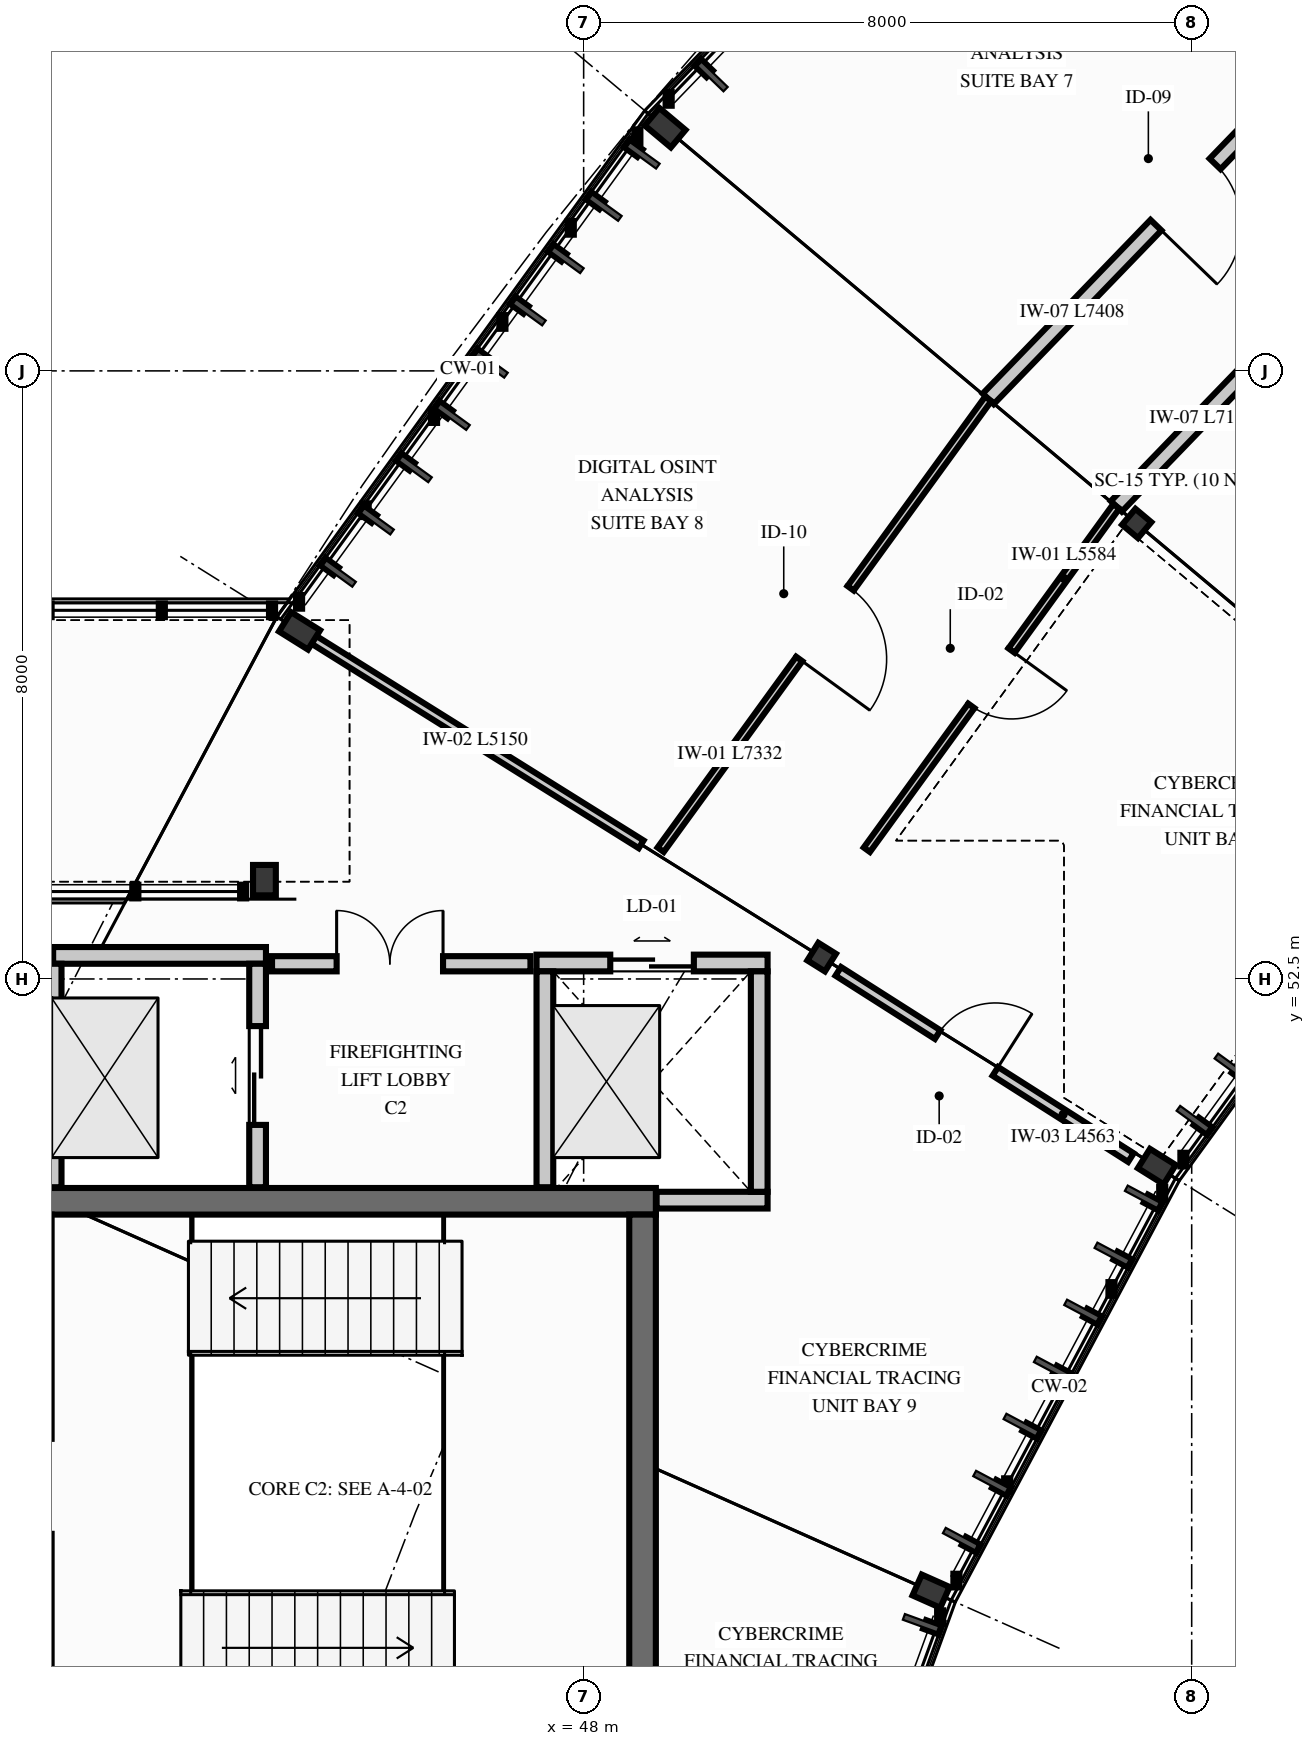
"""IFC4 building model, lengths in metres.
Left out: names, types, materials, properties, quantities, classifications, styles, units other than length and angle.
Written with IfcOpenShell. Run it as: python <this file> out.ifc"""

import sys

from ifc_helpers import new_model, si_unit, direction, frame, frame_2d, origin, origin_2d, place, context, subcontext, project, spatial, rectangle, hollow_circle, i_section, extrude, element, fill, save


model = new_model("IFC4")
c1 = context("Model", 3, precision=1e-05, world=origin(), true_north=direction((0.0, 1.0)))
c2 = subcontext(c1, "Body", "Model", "MODEL_VIEW")
j1 = project(units=[si_unit("LENGTHUNIT", "METRE"), si_unit("PLANEANGLEUNIT", "RADIAN")], contexts=[c1])
p1 = place(None, origin())
s1 = spatial("IfcSite", under=j1, at=p1, CompositionType="ELEMENT")
p2 = place(p1, origin())
s2 = spatial("IfcBuilding", under=s1, at=p2, CompositionType="ELEMENT")
p3 = place(p2, frame((0.0, 0.0, 13.5)))
s3 = spatial("IfcBuildingStorey", under=s2, at=p3, CompositionType="ELEMENT", Elevation=13.5)
p4 = place(p3, frame((40.65, 49.575, 0.0), z_axis=(0.0, 0.0, 1.0), x_axis=(1.0, 0.0, 0.0)))
e1 = element("IfcWall", 1, at=p4, inside=s3, PredefinedType="SHEAR", context=c2, shape_type="SweptSolid", body=[
    extrude(rectangle(XDim=8.3, YDim=0.35, at=frame_2d((4.15, 0.0))), origin(), (0.0, 0.0, 1.0), 4.0),
])
p5 = place(p3, frame((48.775, 42.6, 0.0), z_axis=(0.0, 0.0, 1.0), x_axis=(0.0, 1.0, 0.0)))
e2 = element("IfcWall", 2, at=p5, inside=s3, PredefinedType="SHEAR", context=c2, shape_type="SweptSolid", body=[
    extrude(rectangle(XDim=6.8, YDim=0.35, at=frame_2d((3.4, 0.0))), origin(), (0.0, 0.0, 1.0), 4.0),
])
p6 = place(p3, frame((55.277, 58.493, 0.0), z_axis=(0.0, 0.0, 1.0), x_axis=(0.642787609687, 0.766044443119, 0.0)))
e3 = element("IfcColumn", 3, at=p6, inside=s3, PredefinedType="COLUMN", context=c2, shape_type="SweptSolid", body=[
    extrude(hollow_circle(Radius=0.136, WallThickness=0.012, at=origin_2d()), origin(), (0.0, 0.0, 1.0), 4.2),
])
p7 = place(p3, frame((49.072, 63.699, 0.0), z_axis=(0.0, 0.0, 1.0), x_axis=(0.642787609687, 0.766044443119, 0.0)))
e4 = element("IfcColumn", 4, at=p7, inside=s3, PredefinedType="COLUMN", context=c2, shape_type="SweptSolid", body=[
    extrude(i_section(OverallWidth=0.3, OverallDepth=0.45, WebThickness=0.014, FlangeThickness=0.026, FilletRadius=0.027, at=origin_2d()), origin(), (0.0, 0.0, 1.0), 4.2),
])
p8 = place(p3, frame((55.541, 50.032, 0.0), z_axis=(0.0, 0.0, 1.0), x_axis=(0.529919264233, 0.848048096156, 0.0)))
e5 = element("IfcColumn", 5, at=p8, inside=s3, PredefinedType="COLUMN", context=c2, shape_type="SweptSolid", body=[
    extrude(i_section(OverallWidth=0.3, OverallDepth=0.4, WebThickness=0.013, FlangeThickness=0.024, FilletRadius=0.027, at=origin_2d()), origin(), (0.0, 0.0, 1.0), 4.2),
])
p9 = place(p3, frame((51.131, 52.787, 0.0), z_axis=(0.0, 0.0, 1.0), x_axis=(0.529919264233, 0.848048096156, 0.0)))
e6 = element("IfcColumn", 6, at=p9, inside=s3, PredefinedType="COLUMN", context=c2, shape_type="SweptSolid", body=[
    extrude(hollow_circle(Radius=0.136, WallThickness=0.012, at=origin_2d()), origin(), (0.0, 0.0, 1.0), 4.2),
])
p10 = place(p3, frame((44.262, 57.08, 0.0), z_axis=(0.0, 0.0, 1.0), x_axis=(0.529919264233, 0.848048096156, 0.0)))
e7 = element("IfcColumn", 7, at=p10, inside=s3, PredefinedType="COLUMN", context=c2, shape_type="SweptSolid", body=[
    extrude(i_section(OverallWidth=0.3, OverallDepth=0.45, WebThickness=0.014, FlangeThickness=0.026, FilletRadius=0.027, at=origin_2d()), origin(), (0.0, 0.0, 1.0), 4.2),
])
p11 = place(p3, frame((52.571, 44.446, 0.0), z_axis=(0.0, 0.0, 1.0), x_axis=(0.406736643076, 0.913545457643, 0.0)))
e8 = element("IfcColumn", 8, at=p11, inside=s3, PredefinedType="COLUMN", context=c2, shape_type="SweptSolid", body=[
    extrude(i_section(OverallWidth=0.3, OverallDepth=0.4, WebThickness=0.013, FlangeThickness=0.024, FilletRadius=0.027, at=origin_2d()), origin(), (0.0, 0.0, 1.0), 4.2),
])
p12 = place(p3, frame((43.8, 53.8, 0.0), z_axis=(0.0, 0.0, 1.0), x_axis=(1.0, 0.0, 0.0)))
e9 = element("IfcColumn", 9, at=p12, inside=s3, PredefinedType="COLUMN", context=c2, shape_type="SweptSolid", body=[
    extrude(i_section(OverallWidth=0.3, OverallDepth=0.4, WebThickness=0.013, FlangeThickness=0.024, FilletRadius=0.027, at=origin_2d()), origin(), (0.0, 0.0, 1.0), 3.94),
])
p13 = place(p3, frame((41.02, 52.81, 0.0), z_axis=(0.0, 0.0, 1.0), x_axis=(1.0, 0.0, 0.0)))
e10 = element("IfcWall", 10, at=p13, inside=s3, PredefinedType="PARTITIONING", context=c2, shape_type="SweptSolid", body=[
    extrude(rectangle(XDim=2.8, YDim=0.22, at=frame_2d((1.4, 0.0))), origin(), (0.0, 0.0, 1.0), 3.98),
])
p14 = place(p3, frame((41.02, 49.76, 0.0), z_axis=(0.0, 0.0, 1.0), x_axis=(0.0, 1.0, 0.0)))
e11 = element("IfcWall", 11, at=p14, inside=s3, PredefinedType="PARTITIONING", context=c2, shape_type="SweptSolid", body=[
    extrude(rectangle(XDim=2.94, YDim=0.22, at=frame_2d((1.47, 0.0))), origin(), (0.0, 0.0, 1.0), 3.98),
])
p15 = place(p3, frame((43.71, 49.76, 0.0), z_axis=(0.0, 0.0, 1.0), x_axis=(0.0, 1.0, 0.0)))
e12 = element("IfcWall", 12, at=p15, inside=s3, PredefinedType="PARTITIONING", context=c2, shape_type="SweptSolid", body=[
    extrude(rectangle(XDim=2.94, YDim=0.22, at=frame_2d((1.47, 0.0))), origin(), (0.0, 0.0, 1.0), 3.98),
])
p16 = place(p15, frame((0.82, 0.0, 0.0)))
e13 = element("IfcOpeningElement", 13, at=p16, cuts=e12, PredefinedType="OPENING", context=c2, shape_type="SweptSolid", body=[
    extrude(rectangle(XDim=1.3, YDim=2.2, at=frame_2d((0.65, 1.1))), frame((0.0, 0.12, 0.0), z_axis=(0.0, -1.0, 0.0), x_axis=(1.0, 0.0, 0.0)), (0.0, 0.0, 1.0), 0.24),
])
p17 = place(p3, frame((48.96, 49.59, 0.0), z_axis=(0.0, 0.0, 1.0), x_axis=(1.0, 0.0, 0.0)))
e14 = element("IfcWall", 14, at=p17, inside=s3, PredefinedType="PARTITIONING", context=c2, shape_type="SweptSolid", body=[
    extrude(rectangle(XDim=1.46, YDim=0.22, at=frame_2d((0.73, 0.0))), origin(), (0.0, 0.0, 1.0), 3.98),
])
p18 = place(p3, frame((47.38, 52.71, 0.0), z_axis=(0.0, 0.0, 1.0), x_axis=(1.0, 0.0, 0.0)))
e15 = element("IfcWall", 15, at=p18, inside=s3, PredefinedType="PARTITIONING", context=c2, shape_type="SweptSolid", body=[
    extrude(rectangle(XDim=3.04, YDim=0.22, at=frame_2d((1.52, 0.0))), origin(), (0.0, 0.0, 1.0), 3.98),
])
p19 = place(p18, frame((0.97, 0.0, 0.0)))
e16 = element("IfcOpeningElement", 16, at=p19, cuts=e15, PredefinedType="OPENING", context=c2, shape_type="SweptSolid", body=[
    extrude(rectangle(XDim=1.1, YDim=2.15, at=frame_2d((0.55, 1.075))), frame((0.0, 0.12, 0.0), z_axis=(0.0, -1.0, 0.0), x_axis=(1.0, 0.0, 0.0)), (0.0, 0.0, 1.0), 0.24),
])
p20 = place(p3, frame((47.49, 49.76, 0.0), z_axis=(0.0, 0.0, 1.0), x_axis=(0.0, 1.0, 0.0)))
e17 = element("IfcWall", 17, at=p20, inside=s3, PredefinedType="PARTITIONING", context=c2, shape_type="SweptSolid", body=[
    extrude(rectangle(XDim=2.84, YDim=0.22, at=frame_2d((1.42, 0.0))), origin(), (0.0, 0.0, 1.0), 3.98),
])
p21 = place(p3, frame((50.31, 49.7, 0.0), z_axis=(0.0, 0.0, 1.0), x_axis=(0.0, 1.0, 0.0)))
e18 = element("IfcWall", 18, at=p21, inside=s3, PredefinedType="PARTITIONING", context=c2, shape_type="SweptSolid", body=[
    extrude(rectangle(XDim=2.9, YDim=0.22, at=frame_2d((1.45, 0.0))), origin(), (0.0, 0.0, 1.0), 3.98),
])
p22 = place(p3, frame((43.9, 52.7, 0.0), z_axis=(0.0, 0.0, 1.0), x_axis=(1.0, 0.0, 0.0)))
e19 = element("IfcWall", 19, at=p22, inside=s3, PredefinedType="PARTITIONING", context=c2, shape_type="SweptSolid", body=[
    extrude(rectangle(XDim=3.4, YDim=0.2, at=frame_2d((1.7, 0.0))), origin(), (0.0, 0.0, 1.0), 3.98),
])
p23 = place(p22, frame((0.85, 0.0, 0.0)))
e20 = element("IfcOpeningElement", 20, at=p23, cuts=e19, PredefinedType="OPENING", context=c2, shape_type="SweptSolid", body=[
    extrude(rectangle(XDim=1.4, YDim=2.25, at=frame_2d((0.7, 1.125))), frame((0.0, 0.11, 0.0), z_axis=(0.0, -1.0, 0.0), x_axis=(1.0, 0.0, 0.0)), (0.0, 0.0, 1.0), 0.22),
])
p24 = place(p3, frame((51.35, 52.6, 0.0), z_axis=(0.0, 0.0, 1.0), x_axis=(0.84363284859, -0.536920493909, 0.0)))
e21 = element("IfcWall", 21, at=p24, inside=s3, PredefinedType="PARTITIONING", context=c2, shape_type="SweptSolid", body=[
    extrude(rectangle(XDim=4.563, YDim=0.135, at=frame_2d((2.282, 0.0))), origin(), (0.0, 0.0, 1.0), 3.6),
])
p25 = place(p24, frame((1.55, 0.0, 0.0)))
e22 = element("IfcOpeningElement", 22, at=p25, cuts=e21, PredefinedType="OPENING", context=c2, shape_type="SweptSolid", body=[
    extrude(rectangle(XDim=0.9, YDim=2.1, at=frame_2d((0.45, 1.05))), frame((0.0, 0.077, 0.0), z_axis=(0.0, -1.0, 0.0), x_axis=(1.0, 0.0, 0.0)), (0.0, 0.0, 1.0), 0.155),
])
p26 = place(p3, frame((59.941, 63.826, 0.0), z_axis=(0.0, 0.0, 1.0), x_axis=(-0.694674270111, -0.719324445884, 0.0)))
e23 = element("IfcWall", 23, at=p26, inside=s3, PredefinedType="PARTITIONING", context=c2, shape_type="SweptSolid", body=[
    extrude(rectangle(XDim=7.101, YDim=0.2, at=frame_2d((3.551, 0.0))), origin(), (0.0, 0.0, 1.0), 3.98),
])
p27 = place(p26, frame((2.983, 0.0, 0.0)))
e24 = element("IfcOpeningElement", 24, at=p27, cuts=e23, PredefinedType="OPENING", context=c2, shape_type="SweptSolid", body=[
    extrude(rectangle(XDim=0.88, YDim=2.1, at=frame_2d((0.44, 1.05))), frame((0.0, 0.11, 0.0), z_axis=(0.0, -1.0, 0.0), x_axis=(1.0, 0.0, 0.0)), (0.0, 0.0, 1.0), 0.22),
])
p28 = place(p3, frame((58.469, 65.461, 0.0), z_axis=(0.0, 0.0, 1.0), x_axis=(-0.694673907436, -0.71932479613, 0.0)))
e25 = element("IfcWall", 25, at=p28, inside=s3, PredefinedType="PARTITIONING", context=c2, shape_type="SweptSolid", body=[
    extrude(rectangle(XDim=7.408, YDim=0.2, at=frame_2d((3.704, 0.0))), origin(), (0.0, 0.0, 1.0), 3.98),
])
p29 = place(p28, frame((3.111, 0.0, 0.0)))
e26 = element("IfcOpeningElement", 26, at=p29, cuts=e25, PredefinedType="OPENING", context=c2, shape_type="SweptSolid", body=[
    extrude(rectangle(XDim=1.12, YDim=2.2, at=frame_2d((0.56, 1.1))), frame((0.0, 0.11, 0.0), z_axis=(0.0, -1.0, 0.0), x_axis=(1.0, 0.0, 0.0)), (0.0, 0.0, 1.0), 0.22),
])
p30 = place(p3, frame((55.008, 58.718, 0.0), z_axis=(0.0, 0.0, 1.0), x_axis=(-0.587773920785, -0.809025227076, 0.0)))
e27 = element("IfcWall", 27, at=p30, inside=s3, PredefinedType="PARTITIONING", context=c2, shape_type="SweptSolid", body=[
    extrude(rectangle(XDim=5.584, YDim=0.1, at=frame_2d((2.792, 0.0))), origin(), (0.0, 0.0, 1.0), 3.98),
])
p31 = place(p30, frame((2.345, 0.0, 0.0)))
e28 = element("IfcOpeningElement", 28, at=p31, cuts=e27, PredefinedType="OPENING", context=c2, shape_type="SweptSolid", body=[
    extrude(rectangle(XDim=0.9, YDim=2.1, at=frame_2d((0.45, 1.05))), frame((0.0, 0.06, 0.0), z_axis=(0.0, -1.0, 0.0), x_axis=(1.0, 0.0, 0.0)), (0.0, 0.0, 1.0), 0.12),
])
p32 = place(p3, frame((53.323, 60.132, 0.0), z_axis=(0.0, 0.0, 1.0), x_axis=(-0.587773694682, -0.809025391344, 0.0)))
e29 = element("IfcWall", 29, at=p32, inside=s3, PredefinedType="PARTITIONING", context=c2, shape_type="SweptSolid", body=[
    extrude(rectangle(XDim=7.333, YDim=0.1, at=frame_2d((3.666, 0.0))), origin(), (0.0, 0.0, 1.0), 3.98),
])
p33 = place(p32, frame((3.08, 0.0, 0.0)))
e30 = element("IfcOpeningElement", 30, at=p33, cuts=e29, PredefinedType="OPENING", context=c2, shape_type="SweptSolid", body=[
    extrude(rectangle(XDim=1.15, YDim=2.2, at=frame_2d((0.575, 1.1))), frame((0.0, 0.06, 0.0), z_axis=(0.0, -1.0, 0.0), x_axis=(1.0, 0.0, 0.0)), (0.0, 0.0, 1.0), 0.12),
])
p34 = place(p3, frame((48.757, 54.271, 0.0), z_axis=(0.0, 0.0, 1.0), x_axis=(-0.848054228257, 0.529909450694, 0.0)))
e31 = element("IfcWall", 31, at=p34, inside=s3, PredefinedType="PARTITIONING", context=c2, shape_type="SweptSolid", body=[
    extrude(rectangle(XDim=5.15, YDim=0.12, at=frame_2d((2.575, 0.0))), origin(), (0.0, 0.0, 1.0), 3.55),
])
p35 = place(p16, origin())
e32 = element("IfcDoor", 32, at=p35, inside=s3, OperationType="DOUBLE_DOOR_SLIDING", PredefinedType="DOOR", context=c2, shape_type="SweptSolid", body=[
    extrude(rectangle(XDim=1.3, YDim=2.2, at=frame_2d((0.65, 1.1))), frame((0.0, 0.025, 0.0), z_axis=(0.0, -1.0, 0.0), x_axis=(1.0, 0.0, 0.0)), (0.0, 0.0, 1.0), 0.05),
])
fill(e13, e32)
p36 = place(p19, origin())
e33 = element("IfcDoor", 33, at=p36, inside=s3, OperationType="DOUBLE_DOOR_SLIDING", PredefinedType="DOOR", context=c2, shape_type="SweptSolid", body=[
    extrude(rectangle(XDim=1.1, YDim=2.15, at=frame_2d((0.55, 1.075))), frame((0.0, 0.025, 0.0), z_axis=(0.0, -1.0, 0.0), x_axis=(1.0, 0.0, 0.0)), (0.0, 0.0, 1.0), 0.05),
])
fill(e16, e33)
p37 = place(p23, origin())
e34 = element("IfcDoor", 34, at=p37, inside=s3, OperationType="DOUBLE_DOOR_SINGLE_SWING", PredefinedType="DOOR", context=c2, shape_type="SweptSolid", body=[
    extrude(rectangle(XDim=1.4, YDim=2.25, at=frame_2d((0.7, 1.125))), frame((0.0, 0.025, 0.0), z_axis=(0.0, -1.0, 0.0), x_axis=(1.0, 0.0, 0.0)), (0.0, 0.0, 1.0), 0.05),
])
fill(e20, e34)
p38 = place(p25, origin())
e35 = element("IfcDoor", 35, at=p38, inside=s3, OperationType="SINGLE_SWING_RIGHT", PredefinedType="DOOR", context=c2, shape_type="SweptSolid", body=[
    extrude(rectangle(XDim=0.9, YDim=2.1, at=frame_2d((0.45, 1.05))), frame((0.0, 0.025, 0.0), z_axis=(0.0, -1.0, 0.0), x_axis=(1.0, 0.0, 0.0)), (0.0, 0.0, 1.0), 0.05),
])
fill(e22, e35)
p39 = place(p29, origin())
e36 = element("IfcDoor", 36, at=p39, inside=s3, OperationType="SINGLE_SWING_RIGHT", PredefinedType="DOOR", context=c2, shape_type="SweptSolid", body=[
    extrude(rectangle(XDim=1.12, YDim=2.2, at=frame_2d((0.56, 1.1))), frame((0.0, 0.025, 0.0), z_axis=(0.0, -1.0, 0.0), x_axis=(1.0, 0.0, 0.0)), (0.0, 0.0, 1.0), 0.05),
])
fill(e26, e36)
p40 = place(p31, origin())
e37 = element("IfcDoor", 37, at=p40, inside=s3, OperationType="SINGLE_SWING_LEFT", PredefinedType="DOOR", context=c2, shape_type="SweptSolid", body=[
    extrude(rectangle(XDim=0.9, YDim=2.1, at=frame_2d((0.45, 1.05))), frame((0.0, 0.025, 0.0), z_axis=(0.0, -1.0, 0.0), x_axis=(1.0, 0.0, 0.0)), (0.0, 0.0, 1.0), 0.05),
])
fill(e28, e37)
p41 = place(p33, origin())
e38 = element("IfcDoor", 38, at=p41, inside=s3, OperationType="SINGLE_SWING_RIGHT", PredefinedType="DOOR", context=c2, shape_type="SweptSolid", body=[
    extrude(rectangle(XDim=1.15, YDim=2.2, at=frame_2d((0.575, 1.1))), frame((0.0, 0.025, 0.0), z_axis=(0.0, -1.0, 0.0), x_axis=(1.0, 0.0, 0.0)), (0.0, 0.0, 1.0), 0.05),
])
fill(e30, e38)
save(model, sys.argv[1])
